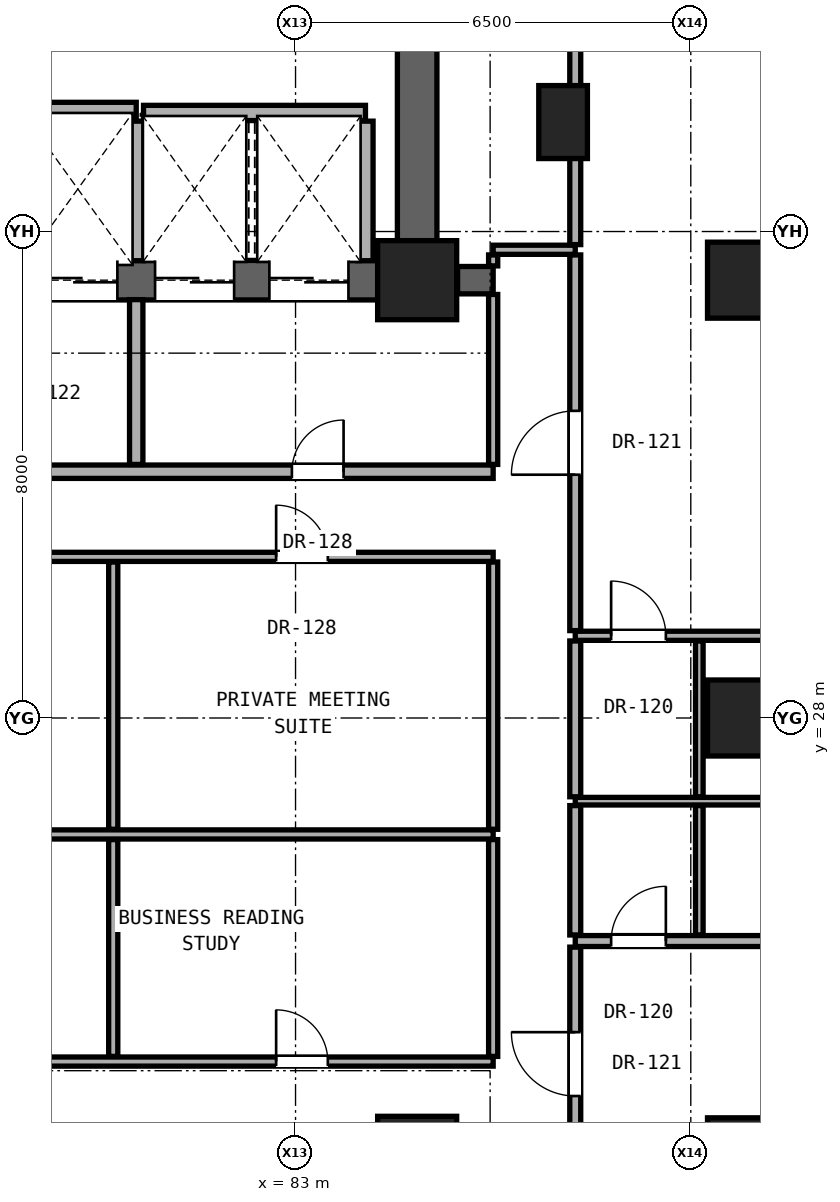
"""IFC4 building model, lengths in metres.
Left out: names, types, materials, properties, quantities, classifications, styles, units other than length and angle.
Written with IfcOpenShell. Run it as: python <this file> out.ifc"""

import sys

from ifc_helpers import new_model, si_unit, direction, frame, frame_2d, origin, origin_2d, place, context, subcontext, project, spatial, rectangle, hollow_rectangle, extrude, element, fill, save


model = new_model("IFC4")
c1 = context("Model", 3, precision=1e-05, world=origin(), true_north=direction((0.0, 1.0)))
c2 = subcontext(c1, "Body", "Model", "MODEL_VIEW")
j1 = project(units=[si_unit("LENGTHUNIT", "METRE"), si_unit("PLANEANGLEUNIT", "RADIAN")], contexts=[c1])
p1 = place(None, origin())
s1 = spatial("IfcSite", under=j1, at=p1, CompositionType="ELEMENT")
p2 = place(p1, origin())
s2 = spatial("IfcBuilding", under=s1, at=p2, CompositionType="ELEMENT")
p3 = place(p2, frame((0.0, 0.0, 65.3)))
s3 = spatial("IfcBuildingStorey", under=s2, at=p3, CompositionType="ELEMENT", Elevation=65.3)
for number, where, z_axis, x_axis in (
    (1, (85.0, 20.8, 0.0), (0.0, 0.0, 1.0), (1.0, 0.0, 0.0)),
    (2, (85.0, 35.2, 0.0), (0.0, 0.0, 1.0), (1.0, 0.0, 0.0)),
):
    element("IfcColumn", number, at=place(p3, frame(where, z_axis=z_axis, x_axis=x_axis)), inside=s3, PredefinedType="COLUMN", context=c2, shape_type="SweptSolid", body=[
        extrude(rectangle(XDim=1.3, YDim=1.3, at=origin_2d()), origin(), (0.0, 0.0, 1.0), 3.3),
    ])
for number, where, z_axis, x_axis in (
    (3, (90.4, 20.8, 0.0), (0.0, 0.0, 1.0), (1.0, 0.0, 0.0)),
    (4, (90.4, 28.0, 0.0), (0.0, 0.0, 1.0), (1.0, 0.0, 0.0)),
    (5, (90.4, 35.2, 0.0), (0.0, 0.0, 1.0), (1.0, 0.0, 0.0)),
):
    element("IfcColumn", number, at=place(p3, frame(where, z_axis=z_axis, x_axis=x_axis)), inside=s3, PredefinedType="COLUMN", context=c2, shape_type="SweptSolid", body=[
        extrude(hollow_rectangle(XDim=1.25, YDim=1.25, WallThickness=0.07, at=origin_2d()), origin(), (0.0, 0.0, 1.0), 3.3),
    ])
p4 = place(p3, frame((87.4, 37.8, 0.0), z_axis=(0.0, 0.0, 1.0), x_axis=(1.0, 0.0, 0.0)))
e6 = element("IfcColumn", 6, at=p4, inside=s3, PredefinedType="PILASTER", context=c2, shape_type="SweptSolid", body=[
    extrude(rectangle(XDim=0.8, YDim=1.2, at=origin_2d()), origin(), (0.0, 0.0, 1.0), 3.3),
])
p5 = place(p3, frame((85.0, 35.2, 0.0), z_axis=(0.0, 0.0, 1.0), x_axis=(0.0, 1.0, 0.0)))
e7 = element("IfcWall", 7, at=p5, inside=s3, PredefinedType="SHEAR", context=c2, shape_type="SweptSolid", body=[
    extrude(rectangle(XDim=5.6, YDim=0.65, at=frame_2d((2.8, 0.0))), origin(), (0.0, 0.0, 1.0), 3.06),
])
p6 = place(p3, frame((68.0, 35.2, 0.0), z_axis=(0.0, 0.0, 1.0), x_axis=(1.0, 0.0, 0.0)))
e8 = element("IfcWall", 8, at=p6, inside=s3, PredefinedType="SHEAR", context=c2, shape_type="SweptSolid", body=[
    extrude(rectangle(XDim=17.0, YDim=0.65, at=frame_2d((8.5, 0.0))), origin(), (0.0, 0.0, 1.0), 3.06),
])
p7 = place(p6, frame((1.06, 0.0, 0.0)))
e9 = element("IfcOpeningElement", 9, at=p7, cuts=e8, PredefinedType="OPENING", context=c2, shape_type="SweptSolid", body=[
    extrude(rectangle(XDim=1.15, YDim=2.2, at=frame_2d((0.575, 1.1))), frame((0.0, 0.335, 0.0), z_axis=(0.0, -1.0, 0.0), x_axis=(1.0, 0.0, 0.0)), (0.0, 0.0, 1.0), 0.67),
])
p8 = place(p6, frame((8.75, 0.0, 0.0)))
e10 = element("IfcOpeningElement", 10, at=p8, cuts=e8, PredefinedType="OPENING", context=c2, shape_type="SweptSolid", body=[
    extrude(rectangle(XDim=1.4, YDim=2.35, at=frame_2d((0.7, 1.175))), frame((0.0, 0.335, 0.0), z_axis=(0.0, -1.0, 0.0), x_axis=(1.0, 0.0, 0.0)), (0.0, 0.0, 1.0), 0.67),
])
p9 = place(p6, frame((10.77, 0.0, 0.0)))
e11 = element("IfcOpeningElement", 11, at=p9, cuts=e8, PredefinedType="OPENING", context=c2, shape_type="SweptSolid", body=[
    extrude(rectangle(XDim=1.3, YDim=2.3, at=frame_2d((0.65, 1.15))), frame((0.0, 0.335, 0.0), z_axis=(0.0, -1.0, 0.0), x_axis=(1.0, 0.0, 0.0)), (0.0, 0.0, 1.0), 0.67),
])
p10 = place(p6, frame((12.69, 0.0, 0.0)))
e12 = element("IfcOpeningElement", 12, at=p10, cuts=e8, PredefinedType="OPENING", context=c2, shape_type="SweptSolid", body=[
    extrude(rectangle(XDim=1.3, YDim=2.3, at=frame_2d((0.65, 1.15))), frame((0.0, 0.335, 0.0), z_axis=(0.0, -1.0, 0.0), x_axis=(1.0, 0.0, 0.0)), (0.0, 0.0, 1.0), 0.67),
])
p11 = place(p6, frame((14.57, 0.0, 0.0)))
e13 = element("IfcOpeningElement", 13, at=p11, cuts=e8, PredefinedType="OPENING", context=c2, shape_type="SweptSolid", body=[
    extrude(rectangle(XDim=1.3, YDim=2.3, at=frame_2d((0.65, 1.15))), frame((0.0, 0.335, 0.0), z_axis=(0.0, -1.0, 0.0), x_axis=(1.0, 0.0, 0.0)), (0.0, 0.0, 1.0), 0.67),
])
p12 = place(p3, frame((66.62, 22.35, 0.0), z_axis=(0.0, 0.0, 1.0), x_axis=(1.0, 0.0, 0.0)))
e14 = element("IfcWall", 14, at=p12, inside=s3, PredefinedType="PARTITIONING", context=c2, shape_type="SweptSolid", body=[
    extrude(rectangle(XDim=19.63, YDim=0.15, at=frame_2d((9.815, 0.0))), origin(), (0.0, 0.0, 1.0), 2.125),
])
p13 = place(p12, frame((8.981, 0.0, 0.0)))
e15 = element("IfcOpeningElement", 15, at=p13, cuts=e14, PredefinedType="OPENING", context=c2, shape_type="SweptSolid", body=[
    extrude(rectangle(XDim=0.85, YDim=2.01, at=frame_2d((0.425, 1.005))), frame((0.0, 0.085, 0.0), z_axis=(0.0, -1.0, 0.0), x_axis=(1.0, 0.0, 0.0)), (0.0, 0.0, 1.0), 0.17),
])
p14 = place(p12, frame((16.061, 0.0, 0.0)))
e16 = element("IfcOpeningElement", 16, at=p14, cuts=e14, PredefinedType="OPENING", context=c2, shape_type="SweptSolid", body=[
    extrude(rectangle(XDim=0.85, YDim=2.01, at=frame_2d((0.425, 1.005))), frame((0.0, 0.085, 0.0), z_axis=(0.0, -1.0, 0.0), x_axis=(1.0, 0.0, 0.0)), (0.0, 0.0, 1.0), 0.17),
])
p15 = place(p3, frame((87.6, 24.332, 0.0), z_axis=(0.0, 0.0, 1.0), x_axis=(1.0, 0.0, 0.0)))
e17 = element("IfcWall", 17, at=p15, inside=s3, PredefinedType="PARTITIONING", context=c2, shape_type="SweptSolid", body=[
    extrude(rectangle(XDim=7.292, YDim=0.18, at=frame_2d((3.646, 0.0))), origin(), (0.0, 0.0, 1.0), 2.196),
])
p16 = place(p15, frame((4.171, 0.0, 0.0)))
e18 = element("IfcOpeningElement", 18, at=p16, cuts=e17, PredefinedType="OPENING", context=c2, shape_type="SweptSolid", body=[
    extrude(rectangle(XDim=0.95, YDim=2.15, at=frame_2d((0.475, 1.075))), frame((0.0, 0.1, 0.0), z_axis=(0.0, -1.0, 0.0), x_axis=(1.0, 0.0, 0.0)), (0.0, 0.0, 1.0), 0.2),
])
p17 = place(p15, frame((0.59, 0.0, 0.0)))
e19 = element("IfcOpeningElement", 19, at=p17, cuts=e17, PredefinedType="OPENING", context=c2, shape_type="SweptSolid", body=[
    extrude(rectangle(XDim=0.9, YDim=2.1, at=frame_2d((0.45, 1.05))), frame((0.0, 0.1, 0.0), z_axis=(0.0, -1.0, 0.0), x_axis=(1.0, 0.0, 0.0)), (0.0, 0.0, 1.0), 0.2),
])
p18 = place(p3, frame((72.05, 26.085, 0.0), z_axis=(0.0, 0.0, 1.0), x_axis=(1.0, 0.0, 0.0)))
e20 = element("IfcWall", 20, at=p18, inside=s3, PredefinedType="PARTITIONING", context=c2, shape_type="SweptSolid", body=[
    extrude(rectangle(XDim=14.2, YDim=0.15, at=frame_2d((7.1, 0.0))), origin(), (0.0, 0.0, 1.0), 2.125),
])
p19 = place(p3, frame((87.6, 26.632, 0.0), z_axis=(0.0, 0.0, 1.0), x_axis=(1.0, 0.0, 0.0)))
e21 = element("IfcWall", 21, at=p19, inside=s3, PredefinedType="PARTITIONING", context=c2, shape_type="SweptSolid", body=[
    extrude(rectangle(XDim=7.292, YDim=0.125, at=frame_2d((3.646, 0.0))), origin(), (0.0, 0.0, 1.0), 2.196),
])
p20 = place(p3, frame((87.6, 29.352, 0.0), z_axis=(0.0, 0.0, 1.0), x_axis=(1.0, 0.0, 0.0)))
e22 = element("IfcWall", 22, at=p20, inside=s3, PredefinedType="PARTITIONING", context=c2, shape_type="SweptSolid", body=[
    extrude(rectangle(XDim=7.292, YDim=0.15, at=frame_2d((3.646, 0.0))), origin(), (0.0, 0.0, 1.0), 2.196),
])
p21 = place(p20, frame((4.171, 0.0, 0.0)))
e23 = element("IfcOpeningElement", 23, at=p21, cuts=e22, PredefinedType="OPENING", context=c2, shape_type="SweptSolid", body=[
    extrude(rectangle(XDim=0.95, YDim=2.15, at=frame_2d((0.475, 1.075))), frame((0.0, 0.085, 0.0), z_axis=(0.0, -1.0, 0.0), x_axis=(1.0, 0.0, 0.0)), (0.0, 0.0, 1.0), 0.17),
])
p22 = place(p20, frame((0.59, 0.0, 0.0)))
e24 = element("IfcOpeningElement", 24, at=p22, cuts=e22, PredefinedType="OPENING", context=c2, shape_type="SweptSolid", body=[
    extrude(rectangle(XDim=0.9, YDim=2.1, at=frame_2d((0.45, 1.05))), frame((0.0, 0.085, 0.0), z_axis=(0.0, -1.0, 0.0), x_axis=(1.0, 0.0, 0.0)), (0.0, 0.0, 1.0), 0.17),
])
p23 = place(p3, frame((66.62, 30.65, 0.0), z_axis=(0.0, 0.0, 1.0), x_axis=(1.0, 0.0, 0.0)))
e25 = element("IfcWall", 25, at=p23, inside=s3, PredefinedType="PARTITIONING", context=c2, shape_type="SweptSolid", body=[
    extrude(rectangle(XDim=19.63, YDim=0.15, at=frame_2d((9.815, 0.0))), origin(), (0.0, 0.0, 1.0), 2.125),
])
p24 = place(p23, frame((3.855, 0.0, 0.0)))
e26 = element("IfcOpeningElement", 26, at=p24, cuts=e25, PredefinedType="OPENING", context=c2, shape_type="SweptSolid", body=[
    extrude(rectangle(XDim=0.85, YDim=2.01, at=frame_2d((0.425, 1.005))), frame((0.0, 0.085, 0.0), z_axis=(0.0, -1.0, 0.0), x_axis=(1.0, 0.0, 0.0)), (0.0, 0.0, 1.0), 0.17),
])
p25 = place(p23, frame((8.981, 0.0, 0.0)))
e27 = element("IfcOpeningElement", 27, at=p25, cuts=e25, PredefinedType="OPENING", context=c2, shape_type="SweptSolid", body=[
    extrude(rectangle(XDim=0.85, YDim=2.01, at=frame_2d((0.425, 1.005))), frame((0.0, 0.085, 0.0), z_axis=(0.0, -1.0, 0.0), x_axis=(1.0, 0.0, 0.0)), (0.0, 0.0, 1.0), 0.17),
])
p26 = place(p23, frame((16.061, 0.0, 0.0)))
e28 = element("IfcOpeningElement", 28, at=p26, cuts=e25, PredefinedType="OPENING", context=c2, shape_type="SweptSolid", body=[
    extrude(rectangle(XDim=0.85, YDim=2.01, at=frame_2d((0.425, 1.005))), frame((0.0, 0.085, 0.0), z_axis=(0.0, -1.0, 0.0), x_axis=(1.0, 0.0, 0.0)), (0.0, 0.0, 1.0), 0.17),
])
p27 = place(p3, frame((71.55, 32.05, 0.0), z_axis=(0.0, 0.0, 1.0), x_axis=(1.0, 0.0, 0.0)))
e29 = element("IfcWall", 29, at=p27, inside=s3, PredefinedType="SOLIDWALL", context=c2, shape_type="SweptSolid", body=[
    extrude(rectangle(XDim=14.7, YDim=0.22, at=frame_2d((7.35, 0.0))), origin(), (0.0, 0.0, 1.0), 2.125),
])
p28 = place(p27, frame((11.39, 0.0, 0.0)))
e30 = element("IfcOpeningElement", 30, at=p28, cuts=e29, PredefinedType="OPENING", context=c2, shape_type="SweptSolid", body=[
    extrude(rectangle(XDim=0.85, YDim=2.01, at=frame_2d((0.425, 1.005))), frame((0.0, 0.12, 0.0), z_axis=(0.0, -1.0, 0.0), x_axis=(1.0, 0.0, 0.0)), (0.0, 0.0, 1.0), 0.24),
])
p29 = place(p27, frame((6.065, 0.0, 0.0)))
e31 = element("IfcOpeningElement", 31, at=p29, cuts=e29, PredefinedType="OPENING", context=c2, shape_type="SweptSolid", body=[
    extrude(rectangle(XDim=0.85, YDim=2.01, at=frame_2d((0.425, 1.005))), frame((0.0, 0.12, 0.0), z_axis=(0.0, -1.0, 0.0), x_axis=(1.0, 0.0, 0.0)), (0.0, 0.0, 1.0), 0.24),
])
p30 = place(p27, frame((0.7, 0.0, 0.0)))
e32 = element("IfcOpeningElement", 32, at=p30, cuts=e29, PredefinedType="OPENING", context=c2, shape_type="SweptSolid", body=[
    extrude(rectangle(XDim=0.85, YDim=2.01, at=frame_2d((0.425, 1.005))), frame((0.0, 0.12, 0.0), z_axis=(0.0, -1.0, 0.0), x_axis=(1.0, 0.0, 0.0)), (0.0, 0.0, 1.0), 0.24),
])
p31 = place(p27, frame((2.55, 0.0, 0.0)))
e33 = element("IfcOpeningElement", 33, at=p31, cuts=e29, PredefinedType="OPENING", context=c2, shape_type="SweptSolid", body=[
    extrude(rectangle(XDim=0.85, YDim=2.01, at=frame_2d((0.425, 1.005))), frame((0.0, 0.12, 0.0), z_axis=(0.0, -1.0, 0.0), x_axis=(1.0, 0.0, 0.0)), (0.0, 0.0, 1.0), 0.24),
])
p32 = place(p3, frame((85.665, 35.2, 0.0), z_axis=(0.0, 0.0, 1.0), x_axis=(1.0, 0.0, 0.0)))
e34 = element("IfcWall", 34, at=p32, inside=s3, PredefinedType="SHEAR", context=c2, shape_type="SweptSolid", body=[
    extrude(rectangle(XDim=0.585, YDim=0.45, at=frame_2d((0.292, 0.0))), origin(), (0.0, 0.0, 1.0), 3.06),
])
p33 = place(p3, frame((86.25, 35.7, 0.0), z_axis=(0.0, 0.0, 1.0), x_axis=(1.0, 0.0, 0.0)))
e35 = element("IfcWall", 35, at=p33, inside=s3, PredefinedType="PARTITIONING", context=c2, shape_type="SweptSolid", body=[
    extrude(rectangle(XDim=1.35, YDim=0.15, at=frame_2d((0.675, 0.0))), origin(), (0.0, 0.0, 1.0), 3.06),
])
p34 = place(p3, frame((80.5, 37.95, 0.0), z_axis=(0.0, 0.0, 1.0), x_axis=(1.0, 0.0, 0.0)))
e36 = element("IfcWall", 36, at=p34, inside=s3, PredefinedType="SOLIDWALL", context=c2, shape_type="SweptSolid", body=[
    extrude(rectangle(XDim=3.65, YDim=0.25, at=frame_2d((1.825, 0.0))), origin(), (0.0, 0.0, 1.0), 3.06),
])
p35 = place(p3, frame((76.72, 38.0, 0.0), z_axis=(0.0, 0.0, 1.0), x_axis=(1.0, 0.0, 0.0)))
e37 = element("IfcWall", 37, at=p35, inside=s3, PredefinedType="SOLIDWALL", context=c2, shape_type="SweptSolid", body=[
    extrude(rectangle(XDim=3.66, YDim=0.25, at=frame_2d((1.83, 0.0))), origin(), (0.0, 0.0, 1.0), 3.06),
])
p36 = place(p3, frame((80.002, 22.435, 0.0), z_axis=(0.0, 0.0, 1.0), x_axis=(0.0, 1.0, 0.0)))
e38 = element("IfcWall", 38, at=p36, inside=s3, PredefinedType="PARTITIONING", context=c2, shape_type="SweptSolid", body=[
    extrude(rectangle(XDim=3.565, YDim=0.15, at=frame_2d((1.782, 0.0))), origin(), (0.0, 0.0, 1.0), 3.06),
])
p37 = place(p3, frame((80.002, 26.17, 0.0), z_axis=(0.0, 0.0, 1.0), x_axis=(0.0, 1.0, 0.0)))
e39 = element("IfcWall", 39, at=p37, inside=s3, PredefinedType="PARTITIONING", context=c2, shape_type="SweptSolid", body=[
    extrude(rectangle(XDim=4.395, YDim=0.15, at=frame_2d((2.198, 0.0))), origin(), (0.0, 0.0, 1.0), 2.125),
])
p38 = place(p3, frame((80.38, 32.17, 0.0), z_axis=(0.0, 0.0, 1.0), x_axis=(0.0, 1.0, 0.0)))
e40 = element("IfcWall", 40, at=p38, inside=s3, PredefinedType="SOLIDWALL", context=c2, shape_type="SweptSolid", body=[
    extrude(rectangle(XDim=2.71, YDim=0.22, at=frame_2d((1.355, 0.0))), origin(), (0.0, 0.0, 1.0), 3.06),
])
for number, where, z_axis, x_axis in (
    (41, (80.38, 35.52, 0.0), (0.0, 0.0, 1.0), (0.0, 1.0, 0.0)),
    (42, (84.15, 35.52, 0.0), (0.0, 0.0, 1.0), (0.0, 1.0, 0.0)),
):
    element("IfcWall", number, at=place(p3, frame(where, z_axis=z_axis, x_axis=x_axis)), inside=s3, PredefinedType="SOLIDWALL", context=c2, shape_type="SweptSolid", body=[
        extrude(rectangle(XDim=2.295, YDim=0.25, at=frame_2d((1.147, 0.0))), origin(), (0.0, 0.0, 1.0), 3.06),
    ])
p39 = place(p3, frame((86.25, 22.435, 0.0), z_axis=(0.0, 0.0, 1.0), x_axis=(0.0, 1.0, 0.0)))
e43 = element("IfcWall", 43, at=p39, inside=s3, PredefinedType="PARTITIONING", context=c2, shape_type="SweptSolid", body=[
    extrude(rectangle(XDim=3.565, YDim=0.15, at=frame_2d((1.782, 0.0))), origin(), (0.0, 0.0, 1.0), 3.06),
])
p40 = place(p3, frame((86.25, 26.17, 0.0), z_axis=(0.0, 0.0, 1.0), x_axis=(0.0, 1.0, 0.0)))
e44 = element("IfcWall", 44, at=p40, inside=s3, PredefinedType="PARTITIONING", context=c2, shape_type="SweptSolid", body=[
    extrude(rectangle(XDim=4.395, YDim=0.15, at=frame_2d((2.198, 0.0))), origin(), (0.0, 0.0, 1.0), 2.279),
])
p41 = place(p3, frame((86.25, 32.17, 0.0), z_axis=(0.0, 0.0, 1.0), x_axis=(0.0, 1.0, 0.0)))
e45 = element("IfcWall", 45, at=p41, inside=s3, PredefinedType="PARTITIONING", context=c2, shape_type="SweptSolid", body=[
    extrude(rectangle(XDim=2.795, YDim=0.15, at=frame_2d((1.397, 0.0))), origin(), (0.0, 0.0, 1.0), 2.452),
])
p42 = place(p3, frame((86.25, 35.435, 0.0), z_axis=(0.0, 0.0, 1.0), x_axis=(0.0, 1.0, 0.0)))
e46 = element("IfcWall", 46, at=p42, inside=s3, PredefinedType="PARTITIONING", context=c2, shape_type="SweptSolid", body=[
    extrude(rectangle(XDim=0.18, YDim=0.15, at=frame_2d((0.09, 0.0))), origin(), (0.0, 0.0, 1.0), 2.452),
])
p43 = place(p3, frame((87.6, 20.385, 0.0), z_axis=(0.0, 0.0, 1.0), x_axis=(0.0, 1.0, 0.0)))
e47 = element("IfcWall", 47, at=p43, inside=s3, PredefinedType="PARTITIONING", context=c2, shape_type="SweptSolid", body=[
    extrude(rectangle(XDim=3.847, YDim=0.18, at=frame_2d((1.923, 0.0))), origin(), (0.0, 0.0, 1.0), 2.452),
])
p44 = place(p43, frame((1.398, 0.0, 0.0)))
e48 = element("IfcOpeningElement", 48, at=p44, cuts=e47, PredefinedType="OPENING", context=c2, shape_type="SweptSolid", body=[
    extrude(rectangle(XDim=1.05, YDim=2.2, at=frame_2d((0.525, 1.1))), frame((0.0, 0.1, 0.0), z_axis=(0.0, -1.0, 0.0), x_axis=(1.0, 0.0, 0.0)), (0.0, 0.0, 1.0), 0.2),
])
p45 = place(p3, frame((87.6, 24.432, 0.0), z_axis=(0.0, 0.0, 1.0), x_axis=(0.0, 1.0, 0.0)))
e49 = element("IfcWall", 49, at=p45, inside=s3, PredefinedType="PARTITIONING", context=c2, shape_type="SweptSolid", body=[
    extrude(rectangle(XDim=2.128, YDim=0.18, at=frame_2d((1.064, 0.0))), origin(), (0.0, 0.0, 1.0), 3.06),
])
p46 = place(p3, frame((87.6, 26.705, 0.0), z_axis=(0.0, 0.0, 1.0), x_axis=(0.0, 1.0, 0.0)))
e50 = element("IfcWall", 50, at=p46, inside=s3, PredefinedType="PARTITIONING", context=c2, shape_type="SweptSolid", body=[
    extrude(rectangle(XDim=2.562, YDim=0.18, at=frame_2d((1.281, 0.0))), origin(), (0.0, 0.0, 1.0), 2.279),
])
p47 = place(p3, frame((87.6, 29.437, 0.0), z_axis=(0.0, 0.0, 1.0), x_axis=(0.0, 1.0, 0.0)))
e51 = element("IfcWall", 51, at=p47, inside=s3, PredefinedType="PARTITIONING", context=c2, shape_type="SweptSolid", body=[
    extrude(rectangle(XDim=6.178, YDim=0.18, at=frame_2d((3.089, 0.0))), origin(), (0.0, 0.0, 1.0), 2.452),
])
p48 = place(p47, frame((2.564, 0.0, 0.0)))
e52 = element("IfcOpeningElement", 52, at=p48, cuts=e51, PredefinedType="OPENING", context=c2, shape_type="SweptSolid", body=[
    extrude(rectangle(XDim=1.05, YDim=2.2, at=frame_2d((0.525, 1.1))), frame((0.0, 0.1, 0.0), z_axis=(0.0, -1.0, 0.0), x_axis=(1.0, 0.0, 0.0)), (0.0, 0.0, 1.0), 0.2),
])
p49 = place(p3, frame((87.6, 35.785, 0.0), z_axis=(0.0, 0.0, 1.0), x_axis=(0.0, 1.0, 0.0)))
e53 = element("IfcWall", 53, at=p49, inside=s3, PredefinedType="PARTITIONING", context=c2, shape_type="SweptSolid", body=[
    extrude(rectangle(XDim=3.693, YDim=0.18, at=frame_2d((1.847, 0.0))), origin(), (0.0, 0.0, 1.0), 2.436),
])
p50 = place(p3, frame((89.64, 24.432, 0.0), z_axis=(0.0, 0.0, 1.0), x_axis=(0.0, 1.0, 0.0)))
e54 = element("IfcWall", 54, at=p50, inside=s3, PredefinedType="PARTITIONING", context=c2, shape_type="SweptSolid", body=[
    extrude(rectangle(XDim=2.128, YDim=0.125, at=frame_2d((1.064, 0.0))), origin(), (0.0, 0.0, 1.0), 3.06),
])
p51 = place(p3, frame((89.64, 26.705, 0.0), z_axis=(0.0, 0.0, 1.0), x_axis=(0.0, 1.0, 0.0)))
e55 = element("IfcWall", 55, at=p51, inside=s3, PredefinedType="PARTITIONING", context=c2, shape_type="SweptSolid", body=[
    extrude(rectangle(XDim=2.562, YDim=0.125, at=frame_2d((1.281, 0.0))), origin(), (0.0, 0.0, 1.0), 2.279),
])
p52 = place(p28, origin())
e56 = element("IfcDoor", 56, at=p52, inside=s3, OperationType="SINGLE_SWING_RIGHT", PredefinedType="DOOR", context=c2, shape_type="SweptSolid", body=[
    extrude(rectangle(XDim=0.85, YDim=2.01, at=frame_2d((0.425, 1.005))), frame((0.0, 0.025, 0.0), z_axis=(0.0, -1.0, 0.0), x_axis=(1.0, 0.0, 0.0)), (0.0, 0.0, 1.0), 0.05),
])
fill(e30, e56)
p53 = place(p44, origin())
e57 = element("IfcDoor", 57, at=p53, inside=s3, OperationType="SINGLE_SWING_RIGHT", PredefinedType="DOOR", context=c2, shape_type="SweptSolid", body=[
    extrude(rectangle(XDim=1.05, YDim=2.2, at=frame_2d((0.525, 1.1))), frame((0.0, 0.025, 0.0), z_axis=(0.0, -1.0, 0.0), x_axis=(1.0, 0.0, 0.0)), (0.0, 0.0, 1.0), 0.05),
])
fill(e48, e57)
p54 = place(p17, origin())
e58 = element("IfcDoor", 58, at=p54, inside=s3, OperationType="SINGLE_SWING_RIGHT", PredefinedType="DOOR", context=c2, shape_type="SweptSolid", body=[
    extrude(rectangle(XDim=0.9, YDim=2.1, at=frame_2d((0.45, 1.05))), frame((0.0, 0.025, 0.0), z_axis=(0.0, -1.0, 0.0), x_axis=(1.0, 0.0, 0.0)), (0.0, 0.0, 1.0), 0.05),
])
fill(e19, e58)
p55 = place(p48, origin())
e59 = element("IfcDoor", 59, at=p55, inside=s3, OperationType="SINGLE_SWING_LEFT", PredefinedType="DOOR", context=c2, shape_type="SweptSolid", body=[
    extrude(rectangle(XDim=1.05, YDim=2.2, at=frame_2d((0.525, 1.1))), frame((0.0, 0.025, 0.0), z_axis=(0.0, -1.0, 0.0), x_axis=(1.0, 0.0, 0.0)), (0.0, 0.0, 1.0), 0.05),
])
fill(e52, e59)
p56 = place(p22, origin())
e60 = element("IfcDoor", 60, at=p56, inside=s3, OperationType="SINGLE_SWING_LEFT", PredefinedType="DOOR", context=c2, shape_type="SweptSolid", body=[
    extrude(rectangle(XDim=0.9, YDim=2.1, at=frame_2d((0.45, 1.05))), frame((0.0, 0.025, 0.0), z_axis=(0.0, -1.0, 0.0), x_axis=(1.0, 0.0, 0.0)), (0.0, 0.0, 1.0), 0.05),
])
fill(e24, e60)
p57 = place(p14, origin())
e61 = element("IfcDoor", 61, at=p57, inside=s3, OperationType="SINGLE_SWING_LEFT", PredefinedType="DOOR", context=c2, shape_type="SweptSolid", body=[
    extrude(rectangle(XDim=0.85, YDim=2.01, at=frame_2d((0.425, 1.005))), frame((0.0, 0.025, 0.0), z_axis=(0.0, -1.0, 0.0), x_axis=(1.0, 0.0, 0.0)), (0.0, 0.0, 1.0), 0.05),
])
fill(e16, e61)
p58 = place(p26, origin())
e62 = element("IfcDoor", 62, at=p58, inside=s3, OperationType="SINGLE_SWING_LEFT", PredefinedType="DOOR", context=c2, shape_type="SweptSolid", body=[
    extrude(rectangle(XDim=0.85, YDim=2.01, at=frame_2d((0.425, 1.005))), frame((0.0, 0.025, 0.0), z_axis=(0.0, -1.0, 0.0), x_axis=(1.0, 0.0, 0.0)), (0.0, 0.0, 1.0), 0.05),
])
fill(e28, e62)
p59 = place(p9, origin())
e63 = element("IfcDoor", 63, at=p59, inside=s3, OperationType="DOUBLE_DOOR_SLIDING", PredefinedType="DOOR", context=c2, shape_type="SweptSolid", body=[
    extrude(rectangle(XDim=1.3, YDim=2.3, at=frame_2d((0.65, 1.15))), frame((0.0, 0.025, 0.0), z_axis=(0.0, -1.0, 0.0), x_axis=(1.0, 0.0, 0.0)), (0.0, 0.0, 1.0), 0.05),
])
fill(e11, e63)
p60 = place(p10, origin())
e64 = element("IfcDoor", 64, at=p60, inside=s3, OperationType="DOUBLE_DOOR_SLIDING", PredefinedType="DOOR", context=c2, shape_type="SweptSolid", body=[
    extrude(rectangle(XDim=1.3, YDim=2.3, at=frame_2d((0.65, 1.15))), frame((0.0, 0.025, 0.0), z_axis=(0.0, -1.0, 0.0), x_axis=(1.0, 0.0, 0.0)), (0.0, 0.0, 1.0), 0.05),
])
fill(e12, e64)
p61 = place(p11, origin())
e65 = element("IfcDoor", 65, at=p61, inside=s3, OperationType="DOUBLE_DOOR_SLIDING", PredefinedType="DOOR", context=c2, shape_type="SweptSolid", body=[
    extrude(rectangle(XDim=1.3, YDim=2.3, at=frame_2d((0.65, 1.15))), frame((0.0, 0.025, 0.0), z_axis=(0.0, -1.0, 0.0), x_axis=(1.0, 0.0, 0.0)), (0.0, 0.0, 1.0), 0.05),
])
fill(e13, e65)
save(model, sys.argv[1])
